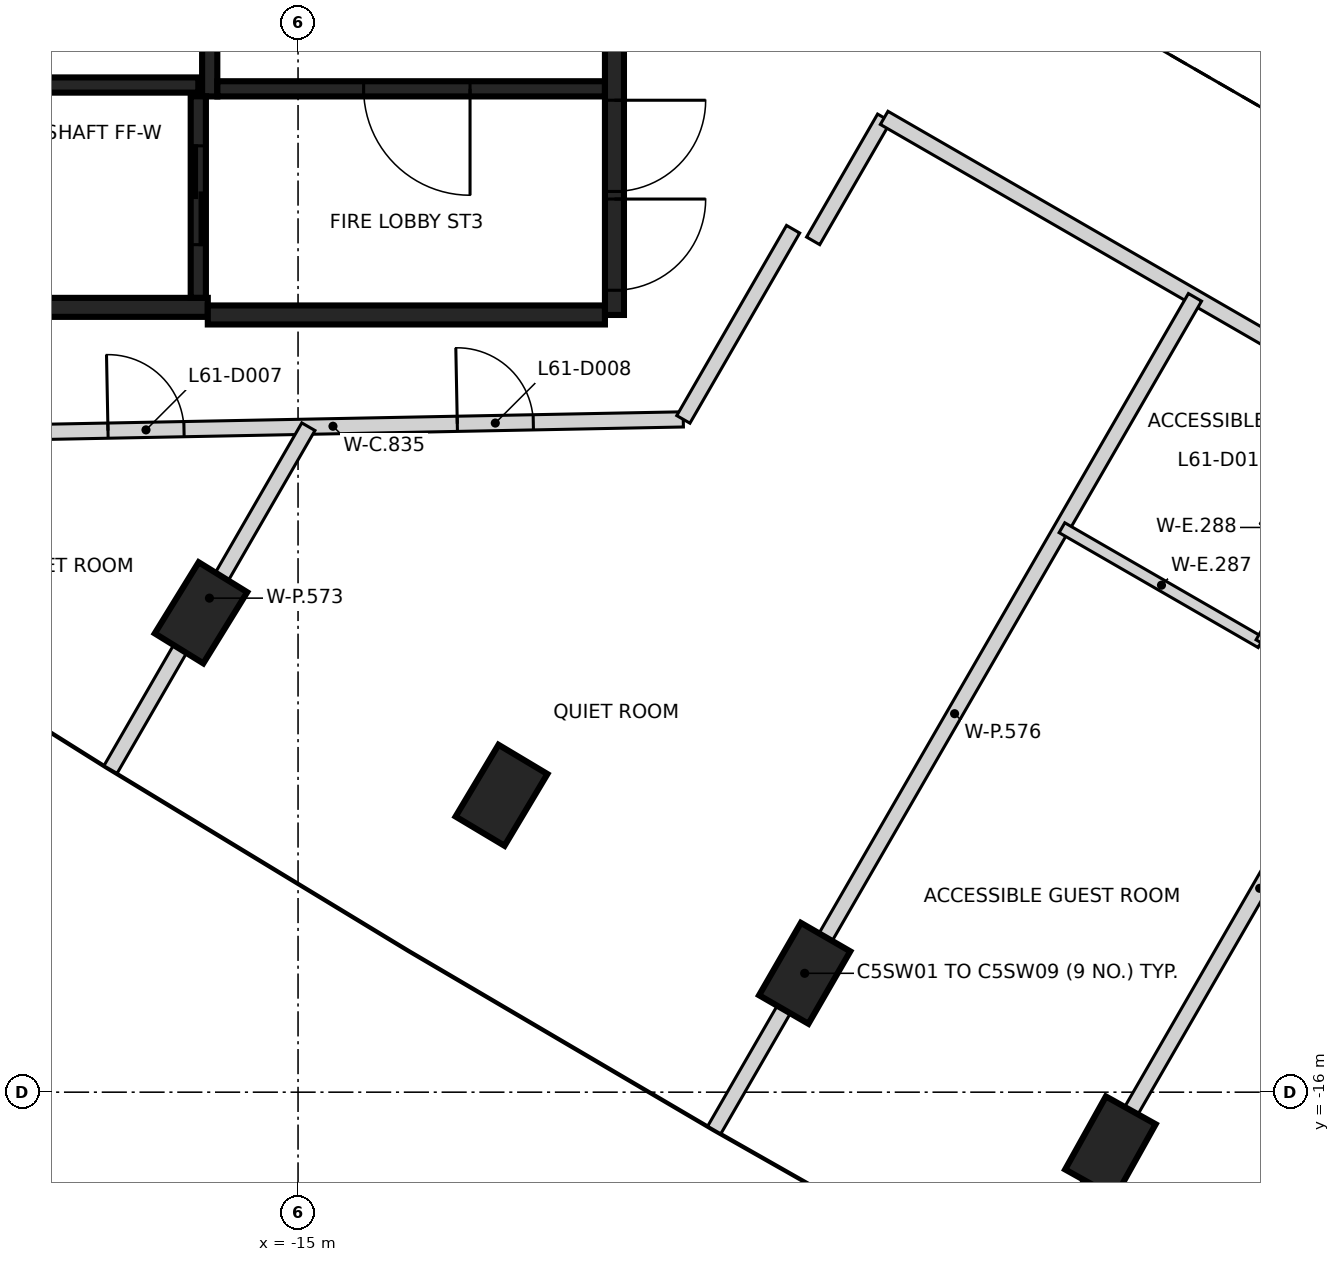
"""IFC4 building model, lengths in metres.
Left out: names, types, materials, properties, quantities, classifications, styles, units other than length and angle.
Written with IfcOpenShell. Run it as: python <this file> out.ifc"""

import sys

from ifc_helpers import new_model, si_unit, direction, frame, frame_2d, origin, origin_2d, place, context, subcontext, project, spatial, rectangle, extrude, element, fill, save


model = new_model("IFC4")
c1 = context("Model", 3, precision=1e-05, world=origin(), true_north=direction((0.0, 1.0)))
c2 = subcontext(c1, "Body", "Model", "MODEL_VIEW")
j1 = project(units=[si_unit("LENGTHUNIT", "METRE"), si_unit("PLANEANGLEUNIT", "RADIAN")], contexts=[c1])
p1 = place(None, origin())
s1 = spatial("IfcSite", under=j1, at=p1, CompositionType="ELEMENT")
p2 = place(p1, origin())
s2 = spatial("IfcBuilding", under=s1, at=p2, CompositionType="ELEMENT")
p3 = place(p2, frame((0.0, 0.0, 243.0)))
s3 = spatial("IfcBuildingStorey", under=s2, at=p3, CompositionType="ELEMENT", Elevation=243.0)
for number, where, z_axis, x_axis in (
    (1, (-16.277, -9.693, -0.35), (0.0, 0.0, 1.0), (0.525, 0.851, 0.0)),
    (2, (-12.323, -12.094, -0.35), (0.0, 0.0, 1.0), (0.513, 0.858, 0.0)),
    (3, (-8.335, -14.436, -0.35), (0.0, 0.0, 1.0), (0.5, 0.866, 0.0)),
    (4, (-4.312, -16.719, -0.35), (0.0, 0.0, 1.0), (0.487, 0.873, 0.0)),
):
    element("IfcColumn", number, at=place(p3, frame(where, z_axis=z_axis, x_axis=x_axis)), inside=s3, PredefinedType="COLUMN", context=c2, shape_type="SweptSolid", body=[
        extrude(rectangle(XDim=1.1, YDim=0.75, at=origin_2d()), origin(), (0.0, 0.0, 1.0), 3.6),
    ])
p4 = place(p3, frame((-10.837, 5.775, 0.0), z_axis=(0.0, 0.0, 1.0), x_axis=(0.0, -1.0, 0.0)))
e5 = element("IfcWall", 5, at=p4, inside=s3, PredefinedType="SHEAR", context=c2, shape_type="SweptSolid", body=[
    extrude(rectangle(XDim=11.55, YDim=0.25, at=frame_2d((5.775, 0.0))), origin(), (0.0, 0.0, 1.0), 3.25),
])
p5 = place(p4, frame((10.025, 0.0, 0.0)))
e6 = element("IfcOpeningElement", 6, at=p5, cuts=e5, PredefinedType="OPENING", context=c2, shape_type="SweptSolid", body=[
    extrude(rectangle(XDim=1.2, YDim=2.1, at=frame_2d((0.6, 1.05))), frame((0.0, 0.135, 0.0), z_axis=(0.0, -1.0, 0.0), x_axis=(1.0, 0.0, 0.0)), (0.0, 0.0, 1.0), 0.27),
])
p6 = place(p4, frame((8.725, 0.0, 0.0)))
e7 = element("IfcOpeningElement", 7, at=p6, cuts=e5, PredefinedType="OPENING", context=c2, shape_type="SweptSolid", body=[
    extrude(rectangle(XDim=1.2, YDim=2.1, at=frame_2d((0.6, 1.05))), frame((0.0, 0.135, 0.0), z_axis=(0.0, -1.0, 0.0), x_axis=(1.0, 0.0, 0.0)), (0.0, 0.0, 1.0), 0.27),
])
p7 = place(p3, frame((-16.187, -5.675, 0.0), z_axis=(0.0, 0.0, 1.0), x_axis=(-1.0, 0.0, 0.0)))
e8 = element("IfcWall", 8, at=p7, inside=s3, PredefinedType="SHEAR", context=c2, shape_type="SweptSolid", body=[
    extrude(rectangle(XDim=6.125, YDim=0.25, at=frame_2d((3.062, 0.0))), origin(), (0.0, 0.0, 1.0), 3.25),
])
p8 = place(p7, frame((3.563, 0.0, 0.0)))
e9 = element("IfcOpeningElement", 9, at=p8, cuts=e8, PredefinedType="OPENING", context=c2, shape_type="SweptSolid", body=[
    extrude(rectangle(XDim=1.0, YDim=2.1, at=frame_2d((0.5, 1.05))), frame((0.0, 0.135, 0.0), z_axis=(0.0, -1.0, 0.0), x_axis=(1.0, 0.0, 0.0)), (0.0, 0.0, 1.0), 0.27),
])
p9 = place(p3, frame((-10.963, -5.775, 0.0), z_axis=(0.0, 0.0, 1.0), x_axis=(-1.0, 0.0, 0.0)))
e10 = element("IfcWall", 10, at=p9, inside=s3, PredefinedType="SHEAR", context=c2, shape_type="SweptSolid", body=[
    extrude(rectangle(XDim=5.225, YDim=0.25, at=frame_2d((2.612, 0.0))), origin(), (0.0, 0.0, 1.0), 3.25),
])
p10 = place(p3, frame((-16.162, 3.074, 0.0), z_axis=(0.0, 0.0, 1.0), x_axis=(0.0, -1.0, 0.0)))
e11 = element("IfcWall", 11, at=p10, inside=s3, PredefinedType="SHEAR", context=c2, shape_type="SweptSolid", body=[
    extrude(rectangle(XDim=5.974, YDim=0.2, at=frame_2d((2.987, 0.0))), origin(), (0.0, 0.0, 1.0), 3.25),
])
p11 = place(p3, frame((-10.963, -2.8, 0.0), z_axis=(0.0, 0.0, 1.0), x_axis=(-1.0, 0.0, 0.0)))
e12 = element("IfcWall", 12, at=p11, inside=s3, PredefinedType="SHEAR", context=c2, shape_type="SweptSolid", body=[
    extrude(rectangle(XDim=5.098, YDim=0.2, at=frame_2d((2.549, 0.0))), origin(), (0.0, 0.0, 1.0), 3.25),
])
p12 = place(p11, frame((1.774, 0.0, 0.0)))
e13 = element("IfcOpeningElement", 13, at=p12, cuts=e12, PredefinedType="OPENING", context=c2, shape_type="SweptSolid", body=[
    extrude(rectangle(XDim=1.4, YDim=2.1, at=frame_2d((0.7, 1.05))), frame((0.0, 0.11, 0.0), z_axis=(0.0, -1.0, 0.0), x_axis=(1.0, 0.0, 0.0)), (0.0, 0.0, 1.0), 0.22),
])
p13 = place(p3, frame((-19.412, -2.75, 0.0), z_axis=(0.0, 0.0, 1.0), x_axis=(1.0, 0.0, 0.0)))
e14 = element("IfcWall", 14, at=p13, inside=s3, PredefinedType="SHEAR", context=c2, shape_type="SweptSolid", body=[
    extrude(rectangle(XDim=3.1, YDim=0.2, at=frame_2d((1.55, 0.0))), origin(), (0.0, 0.0, 1.0), 3.25),
])
p14 = place(p3, frame((-16.312, -2.898, 0.0), z_axis=(0.0, 0.0, 1.0), x_axis=(0.0, -1.0, 0.0)))
e15 = element("IfcWall", 15, at=p14, inside=s3, PredefinedType="SHEAR", context=c2, shape_type="SweptSolid", body=[
    extrude(rectangle(XDim=2.651, YDim=0.2, at=frame_2d((1.325, 0.0))), origin(), (0.0, 0.0, 1.0), 3.25),
])
p15 = place(p14, frame((0.652, 0.0, 0.0)))
e16 = element("IfcOpeningElement", 16, at=p15, cuts=e15, PredefinedType="OPENING", context=c2, shape_type="SweptSolid", body=[
    extrude(rectangle(XDim=1.3, YDim=2.1, at=frame_2d((0.65, 1.05))), frame((0.0, 0.11, 0.0), z_axis=(0.0, -1.0, 0.0), x_axis=(1.0, 0.0, 0.0)), (0.0, 0.0, 1.0), 0.22),
])
p16 = place(p3, frame((-19.149, -7.329, 0.0), z_axis=(0.0, 0.0, 1.0), x_axis=(0.999808990333, 0.019544381503, 0.0)))
e17 = element("IfcWall", 17, at=p16, inside=s3, PredefinedType="PARTITIONING", context=c2, shape_type="SweptSolid", body=[
    extrude(rectangle(XDim=9.219, YDim=0.2, at=frame_2d((4.609, 0.0))), origin(), (0.0, 0.0, 1.0), 3.25),
])
p17 = place(p16, frame((1.649, 0.0, 0.0)))
e18 = element("IfcOpeningElement", 18, at=p17, cuts=e17, PredefinedType="OPENING", context=c2, shape_type="SweptSolid", body=[
    extrude(rectangle(XDim=1.0, YDim=2.1, at=frame_2d((0.5, 1.05))), frame((0.0, 0.11, 0.0), z_axis=(0.0, -1.0, 0.0), x_axis=(1.0, 0.0, 0.0)), (0.0, 0.0, 1.0), 0.22),
])
p18 = place(p16, frame((6.245, 0.0, 0.0)))
e19 = element("IfcOpeningElement", 19, at=p18, cuts=e17, PredefinedType="OPENING", context=c2, shape_type="SweptSolid", body=[
    extrude(rectangle(XDim=1.0, YDim=2.1, at=frame_2d((0.5, 1.05))), frame((0.0, 0.11, 0.0), z_axis=(0.0, -1.0, 0.0), x_axis=(1.0, 0.0, 0.0)), (0.0, 0.0, 1.0), 0.22),
])
p19 = place(p3, frame((-9.931, -7.149, 0.0), z_axis=(0.0, 0.0, 1.0), x_axis=(0.499829760107, 0.866123669525, 0.0)))
e20 = element("IfcWall", 20, at=p19, inside=s3, PredefinedType="PARTITIONING", context=c2, shape_type="SweptSolid", body=[
    extrude(rectangle(XDim=2.889, YDim=0.2, at=frame_2d((1.444, 0.0))), origin(), (0.0, 0.0, 1.0), 3.25),
])
p20 = place(p3, frame((-8.223, -4.8, 0.0), z_axis=(0.0, 0.0, 1.0), x_axis=(0.499835576036, 0.866120313195, 0.0)))
e21 = element("IfcWall", 21, at=p20, inside=s3, PredefinedType="PARTITIONING", context=c2, shape_type="SweptSolid", body=[
    extrude(rectangle(XDim=1.868, YDim=0.2, at=frame_2d((0.934, 0.0))), origin(), (0.0, 0.0, 1.0), 3.25),
])
p21 = place(p3, frame((-7.289, -3.182, 0.0), z_axis=(0.0, 0.0, 1.0), x_axis=(0.865979329032, -0.500079795322, 0.0)))
e22 = element("IfcWall", 22, at=p21, inside=s3, PredefinedType="PARTITIONING", context=c2, shape_type="SweptSolid", body=[
    extrude(rectangle(XDim=13.326, YDim=0.2, at=frame_2d((6.663, 0.0))), origin(), (0.0, 0.0, 1.0), 3.25),
])
p22 = place(p21, frame((8.158, 0.0, 0.0)))
e23 = element("IfcOpeningElement", 23, at=p22, cuts=e22, PredefinedType="OPENING", context=c2, shape_type="SweptSolid", body=[
    extrude(rectangle(XDim=1.0, YDim=2.1, at=frame_2d((0.5, 1.05))), frame((0.0, 0.11, 0.0), z_axis=(0.0, -1.0, 0.0), x_axis=(1.0, 0.0, 0.0)), (0.0, 0.0, 1.0), 0.22),
])
p23 = place(p21, frame((10.865, 0.0, 0.0)))
e24 = element("IfcOpeningElement", 24, at=p23, cuts=e22, PredefinedType="OPENING", context=c2, shape_type="SweptSolid", body=[
    extrude(rectangle(XDim=1.0, YDim=2.1, at=frame_2d((0.5, 1.05))), frame((0.0, 0.11, 0.0), z_axis=(0.0, -1.0, 0.0), x_axis=(1.0, 0.0, 0.0)), (0.0, 0.0, 1.0), 0.22),
])
p24 = place(p3, frame((-17.468, -11.756, 0.0), z_axis=(0.0, 0.0, 1.0), x_axis=(0.499890179513, 0.866088799389, 0.0)))
e25 = element("IfcWall", 25, at=p24, inside=s3, PredefinedType="PARTITIONING", context=c2, shape_type="SweptSolid", body=[
    extrude(rectangle(XDim=5.208, YDim=0.2, at=frame_2d((2.604, 0.0))), origin(), (0.0, 0.0, 1.0), 3.25),
])
p25 = place(p3, frame((-9.525, -16.498, 0.0), z_axis=(0.0, 0.0, 1.0), x_axis=(0.500002007972, 0.866024244478, 0.0)))
e26 = element("IfcWall", 26, at=p25, inside=s3, PredefinedType="PARTITIONING", context=c2, shape_type="SweptSolid", body=[
    extrude(rectangle(XDim=12.65, YDim=0.2, at=frame_2d((6.325, 0.0))), origin(), (0.0, 0.0, 1.0), 3.25),
])
p26 = place(p3, frame((-5.503, -18.781, 0.0), z_axis=(0.0, 0.0, 1.0), x_axis=(0.499968699423, 0.866043474427, 0.0)))
e27 = element("IfcWall", 27, at=p26, inside=s3, PredefinedType="PARTITIONING", context=c2, shape_type="SweptSolid", body=[
    extrude(rectangle(XDim=12.616, YDim=0.2, at=frame_2d((6.308, 0.0))), origin(), (0.0, 0.0, 1.0), 3.25),
])
p27 = place(p3, frame((-4.95, -8.574, 0.0), z_axis=(0.0, 0.0, 1.0), x_axis=(0.866033665757, -0.499985689571, 0.0)))
e28 = element("IfcWall", 28, at=p27, inside=s3, PredefinedType="PARTITIONING", context=c2, shape_type="SweptSolid", body=[
    extrude(rectangle(XDim=3.024, YDim=0.15, at=frame_2d((1.512, 0.0))), origin(), (0.0, 0.0, 1.0), 3.25),
])
p28 = place(p3, frame((-2.331, -10.086, 0.0), z_axis=(0.0, 0.0, 1.0), x_axis=(0.500010275428, 0.866019471182, 0.0)))
e29 = element("IfcWall", 29, at=p28, inside=s3, PredefinedType="PARTITIONING", context=c2, shape_type="SweptSolid", body=[
    extrude(rectangle(XDim=3.5, YDim=0.15, at=frame_2d((1.75, 0.0))), origin(), (0.0, 0.0, 1.0), 3.25),
])
p29 = place(p28, frame((1.35, 0.0, 0.0)))
e30 = element("IfcOpeningElement", 30, at=p29, cuts=e29, PredefinedType="OPENING", context=c2, shape_type="SweptSolid", body=[
    extrude(rectangle(XDim=0.8, YDim=2.1, at=frame_2d((0.4, 1.05))), frame((0.0, 0.085, 0.0), z_axis=(0.0, -1.0, 0.0), x_axis=(1.0, 0.0, 0.0)), (0.0, 0.0, 1.0), 0.17),
])
p30 = place(p15, origin())
e31 = element("IfcDoor", 31, at=p30, inside=s3, OperationType="SLIDING_TO_RIGHT", PredefinedType="DOOR", context=c2, shape_type="SweptSolid", body=[
    extrude(rectangle(XDim=1.3, YDim=2.1, at=frame_2d((0.65, 1.05))), frame((0.0, 0.025, 0.0), z_axis=(0.0, -1.0, 0.0), x_axis=(1.0, 0.0, 0.0)), (0.0, 0.0, 1.0), 0.05),
])
fill(e16, e31)
p31 = place(p5, origin())
e32 = element("IfcDoor", 32, at=p31, inside=s3, OperationType="SINGLE_SWING_LEFT", PredefinedType="DOOR", context=c2, shape_type="SweptSolid", body=[
    extrude(rectangle(XDim=1.2, YDim=2.1, at=frame_2d((0.6, 1.05))), frame((0.0, 0.025, 0.0), z_axis=(0.0, -1.0, 0.0), x_axis=(1.0, 0.0, 0.0)), (0.0, 0.0, 1.0), 0.05),
])
fill(e6, e32)
p32 = place(p6, origin())
e33 = element("IfcDoor", 33, at=p32, inside=s3, OperationType="SINGLE_SWING_RIGHT", PredefinedType="DOOR", context=c2, shape_type="SweptSolid", body=[
    extrude(rectangle(XDim=1.2, YDim=2.1, at=frame_2d((0.6, 1.05))), frame((0.0, 0.025, 0.0), z_axis=(0.0, -1.0, 0.0), x_axis=(1.0, 0.0, 0.0)), (0.0, 0.0, 1.0), 0.05),
])
fill(e7, e33)
p33 = place(p12, origin())
e34 = element("IfcDoor", 34, at=p33, inside=s3, OperationType="SINGLE_SWING_RIGHT", PredefinedType="DOOR", context=c2, shape_type="SweptSolid", body=[
    extrude(rectangle(XDim=1.4, YDim=2.1, at=frame_2d((0.7, 1.05))), frame((0.0, 0.025, 0.0), z_axis=(0.0, -1.0, 0.0), x_axis=(1.0, 0.0, 0.0)), (0.0, 0.0, 1.0), 0.05),
])
fill(e13, e34)
p34 = place(p17, frame((1.0, 0.0, 0.0), z_axis=(0.0, 0.0, 1.0), x_axis=(-1.0, 0.0, 0.0)))
e35 = element("IfcDoor", 35, at=p34, inside=s3, OperationType="SINGLE_SWING_LEFT", PredefinedType="DOOR", context=c2, shape_type="SweptSolid", body=[
    extrude(rectangle(XDim=1.0, YDim=2.1, at=frame_2d((0.5, 1.05))), frame((0.0, 0.025, 0.0), z_axis=(0.0, -1.0, 0.0), x_axis=(1.0, 0.0, 0.0)), (0.0, 0.0, 1.0), 0.05),
])
fill(e18, e35)
p35 = place(p18, frame((1.0, 0.0, 0.0), z_axis=(0.0, 0.0, 1.0), x_axis=(-1.0, 0.0, 0.0)))
e36 = element("IfcDoor", 36, at=p35, inside=s3, OperationType="SINGLE_SWING_LEFT", PredefinedType="DOOR", context=c2, shape_type="SweptSolid", body=[
    extrude(rectangle(XDim=1.0, YDim=2.1, at=frame_2d((0.5, 1.05))), frame((0.0, 0.025, 0.0), z_axis=(0.0, -1.0, 0.0), x_axis=(1.0, 0.0, 0.0)), (0.0, 0.0, 1.0), 0.05),
])
fill(e19, e36)
save(model, sys.argv[1])
